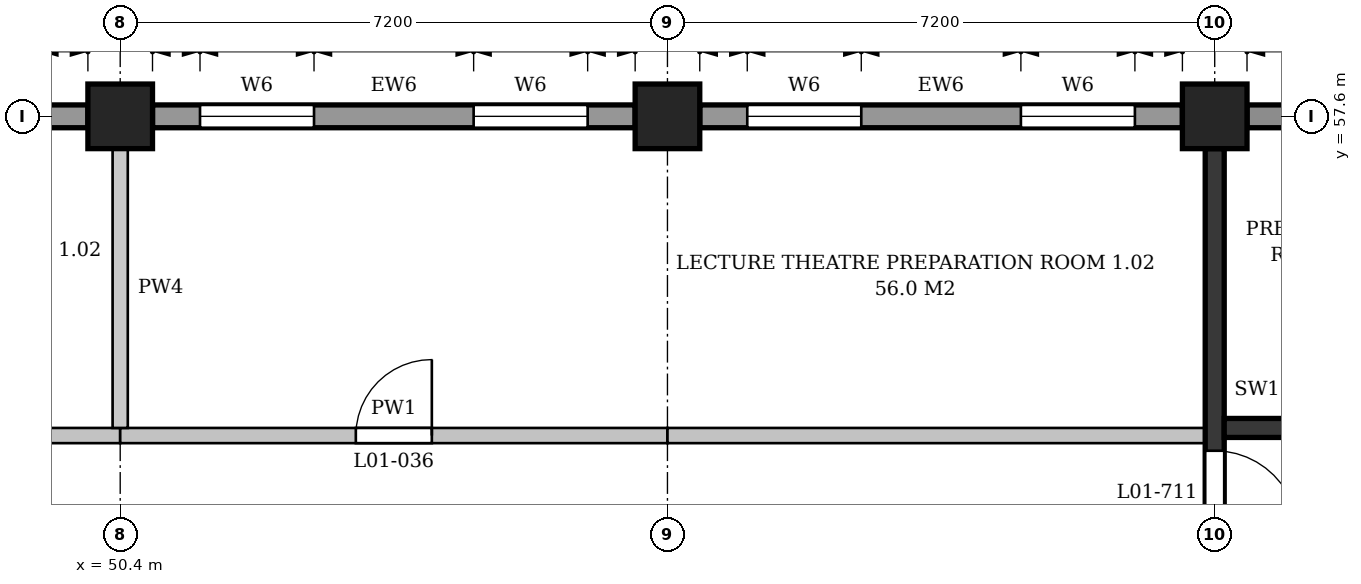
"""IFC4 building model, lengths in metres.
Left out: names, types, materials, properties, quantities, classifications, styles, units other than length and angle.
Written with IfcOpenShell. Run it as: python <this file> out.ifc"""

import sys

from ifc_helpers import new_model, si_unit, direction, frame, frame_2d, origin, origin_2d, place, context, subcontext, project, spatial, polyline, rectangle, outline, extrude, element, fill, save


model = new_model("IFC4")
c1 = context("Model", 3, precision=1e-05, world=origin(), true_north=direction((0.0, 1.0)))
c2 = subcontext(c1, "Body", "Model", "MODEL_VIEW")
j1 = project(units=[si_unit("LENGTHUNIT", "METRE"), si_unit("PLANEANGLEUNIT", "RADIAN")], contexts=[c1])
p1 = place(None, origin())
s1 = spatial("IfcSite", under=j1, at=p1, CompositionType="ELEMENT")
p2 = place(p1, origin())
s2 = spatial("IfcBuilding", under=s1, at=p2, CompositionType="ELEMENT")
p3 = place(p2, frame((0.0, 0.0, 6.0)))
s3 = spatial("IfcBuildingStorey", under=s2, at=p3, CompositionType="ELEMENT", Elevation=6.0)
for number, where, z_axis, x_axis in (
    (1, (50.4, 57.6, 0.0), (0.0, 0.0, 1.0), (1.0, 0.0, 0.0)),
    (2, (57.6, 57.6, 0.0), (0.0, 0.0, 1.0), (1.0, 0.0, 0.0)),
    (3, (64.8, 57.6, 0.0), (0.0, 0.0, 1.0), (1.0, 0.0, 0.0)),
):
    element("IfcColumn", number, at=place(p3, frame(where, z_axis=z_axis, x_axis=x_axis)), inside=s3, PredefinedType="COLUMN", context=c2, shape_type="SweptSolid", body=[
        extrude(rectangle(XDim=0.85, YDim=0.85, at=origin_2d()), origin(), (0.0, 0.0, 1.0), 5.4),
    ])
p4 = place(p3, frame((71.575, 57.6, 0.0), z_axis=(0.0, 0.0, 1.0), x_axis=(-1.0, 0.0, 0.0)))
e4 = element("IfcWall", 4, at=p4, inside=s3, PredefinedType="STANDARD", context=c2, shape_type="SweptSolid", body=[
    extrude(rectangle(XDim=6.35, YDim=0.3, at=frame_2d((3.175, 0.0))), origin(), (0.0, 0.0, 1.0), 4.7),
])
p5 = place(p4, frame((0.925, 0.0, 0.9)))
e5 = element("IfcOpeningElement", 5, at=p5, cuts=e4, PredefinedType="OPENING", context=c2, shape_type="SweptSolid", body=[
    extrude(outline(polyline([(0.0, 0.0), (0.9, 0.0), (0.9, 3.15), (0.45, 3.6), (0.0, 3.15), (0.0, 0.0)])), frame((0.0, 0.16, 0.0), z_axis=(0.0, -1.0, 0.0), x_axis=(1.0, 0.0, 0.0)), (0.0, 0.0, 1.0), 0.32),
])
p6 = place(p3, frame((64.375, 57.6, 0.0), z_axis=(0.0, 0.0, 1.0), x_axis=(-1.0, 0.0, 0.0)))
e6 = element("IfcWall", 6, at=p6, inside=s3, PredefinedType="STANDARD", context=c2, shape_type="SweptSolid", body=[
    extrude(rectangle(XDim=6.35, YDim=0.3, at=frame_2d((3.175, 0.0))), origin(), (0.0, 0.0, 1.0), 4.7),
])
p7 = place(p6, frame((0.625, 0.0, 0.9)))
e7 = element("IfcOpeningElement", 7, at=p7, cuts=e6, PredefinedType="OPENING", context=c2, shape_type="SweptSolid", body=[
    extrude(outline(polyline([(0.0, 0.0), (1.5, 0.0), (1.5, 2.85), (0.75, 3.6), (0.0, 2.85), (0.0, 0.0)])), frame((0.0, 0.16, 0.0), z_axis=(0.0, -1.0, 0.0), x_axis=(1.0, 0.0, 0.0)), (0.0, 0.0, 1.0), 0.32),
])
p8 = place(p6, frame((4.225, 0.0, 0.9)))
e8 = element("IfcOpeningElement", 8, at=p8, cuts=e6, PredefinedType="OPENING", context=c2, shape_type="SweptSolid", body=[
    extrude(outline(polyline([(0.0, 0.0), (1.5, 0.0), (1.5, 2.85), (0.75, 3.6), (0.0, 2.85), (0.0, 0.0)])), frame((0.0, 0.16, 0.0), z_axis=(0.0, -1.0, 0.0), x_axis=(1.0, 0.0, 0.0)), (0.0, 0.0, 1.0), 0.32),
])
p9 = place(p3, frame((57.175, 57.6, 0.0), z_axis=(0.0, 0.0, 1.0), x_axis=(-1.0, 0.0, 0.0)))
e9 = element("IfcWall", 9, at=p9, inside=s3, PredefinedType="STANDARD", context=c2, shape_type="SweptSolid", body=[
    extrude(rectangle(XDim=6.35, YDim=0.3, at=frame_2d((3.175, 0.0))), origin(), (0.0, 0.0, 1.0), 4.7),
])
p10 = place(p9, frame((0.625, 0.0, 0.9)))
e10 = element("IfcOpeningElement", 10, at=p10, cuts=e9, PredefinedType="OPENING", context=c2, shape_type="SweptSolid", body=[
    extrude(outline(polyline([(0.0, 0.0), (1.5, 0.0), (1.5, 2.85), (0.75, 3.6), (0.0, 2.85), (0.0, 0.0)])), frame((0.0, 0.16, 0.0), z_axis=(0.0, -1.0, 0.0), x_axis=(1.0, 0.0, 0.0)), (0.0, 0.0, 1.0), 0.32),
])
p11 = place(p9, frame((4.225, 0.0, 0.9)))
e11 = element("IfcOpeningElement", 11, at=p11, cuts=e9, PredefinedType="OPENING", context=c2, shape_type="SweptSolid", body=[
    extrude(outline(polyline([(0.0, 0.0), (1.5, 0.0), (1.5, 2.85), (0.75, 3.6), (0.0, 2.85), (0.0, 0.0)])), frame((0.0, 0.16, 0.0), z_axis=(0.0, -1.0, 0.0), x_axis=(1.0, 0.0, 0.0)), (0.0, 0.0, 1.0), 0.32),
])
p12 = place(p3, frame((49.975, 57.6, 0.0), z_axis=(0.0, 0.0, 1.0), x_axis=(-1.0, 0.0, 0.0)))
e12 = element("IfcWall", 12, at=p12, inside=s3, PredefinedType="STANDARD", context=c2, shape_type="SweptSolid", body=[
    extrude(rectangle(XDim=6.35, YDim=0.3, at=frame_2d((3.175, 0.0))), origin(), (0.0, 0.0, 1.0), 4.7),
])
p13 = place(p12, frame((0.625, 0.0, 0.9)))
e13 = element("IfcOpeningElement", 13, at=p13, cuts=e12, PredefinedType="OPENING", context=c2, shape_type="SweptSolid", body=[
    extrude(outline(polyline([(0.0, 0.0), (1.5, 0.0), (1.5, 2.85), (0.75, 3.6), (0.0, 2.85), (0.0, 0.0)])), frame((0.0, 0.16, 0.0), z_axis=(0.0, -1.0, 0.0), x_axis=(1.0, 0.0, 0.0)), (0.0, 0.0, 1.0), 0.32),
])
p14 = place(p12, frame((4.225, 0.0, 0.9)))
e14 = element("IfcOpeningElement", 14, at=p14, cuts=e12, PredefinedType="OPENING", context=c2, shape_type="SweptSolid", body=[
    extrude(outline(polyline([(0.0, 0.0), (1.5, 0.0), (1.5, 2.85), (0.75, 3.6), (0.0, 2.85), (0.0, 0.0)])), frame((0.0, 0.16, 0.0), z_axis=(0.0, -1.0, 0.0), x_axis=(1.0, 0.0, 0.0)), (0.0, 0.0, 1.0), 0.32),
])
p15 = place(p3, frame((64.8, 50.825, 0.0), z_axis=(0.0, 0.0, 1.0), x_axis=(0.0, 1.0, 0.0)))
e15 = element("IfcWall", 15, at=p15, inside=s3, PredefinedType="SHEAR", context=c2, shape_type="SweptSolid", body=[
    extrude(rectangle(XDim=6.35, YDim=0.25, at=frame_2d((3.175, 0.0))), origin(), (0.0, 0.0, 1.0), 4.7),
])
p16 = place(p15, frame((1.275, 0.0, 0.0)))
e16 = element("IfcOpeningElement", 16, at=p16, cuts=e15, PredefinedType="OPENING", context=c2, shape_type="SweptSolid", body=[
    extrude(rectangle(XDim=1.1, YDim=2.1, at=frame_2d((0.55, 1.05))), frame((0.0, 0.135, 0.0), z_axis=(0.0, -1.0, 0.0), x_axis=(1.0, 0.0, 0.0)), (0.0, 0.0, 1.0), 0.27),
])
p17 = place(p3, frame((64.925, 53.5, 0.0), z_axis=(0.0, 0.0, 1.0), x_axis=(1.0, 0.0, 0.0)))
e17 = element("IfcWall", 17, at=p17, inside=s3, PredefinedType="SHEAR", context=c2, shape_type="SweptSolid", body=[
    extrude(rectangle(XDim=2.975, YDim=0.25, at=frame_2d((1.487, 0.0))), origin(), (0.0, 0.0, 1.0), 4.7),
])
p18 = place(p17, frame((1.525, 0.0, 0.0)))
e18 = element("IfcOpeningElement", 18, at=p18, cuts=e17, PredefinedType="OPENING", context=c2, shape_type="SweptSolid", body=[
    extrude(rectangle(XDim=0.9, YDim=2.1, at=frame_2d((0.45, 1.05))), frame((0.0, 0.135, 0.0), z_axis=(0.0, -1.0, 0.0), x_axis=(1.0, 0.0, 0.0)), (0.0, 0.0, 1.0), 0.27),
])
p19 = place(p3, frame((43.2, 53.4, 0.0), z_axis=(0.0, 0.0, 1.0), x_axis=(1.0, 0.0, 0.0)))
e19 = element("IfcWall", 19, at=p19, inside=s3, PredefinedType="PARTITIONING", context=c2, shape_type="SweptSolid", body=[
    extrude(rectangle(XDim=7.2, YDim=0.2, at=frame_2d((3.6, 0.0))), origin(), (0.0, 0.0, 1.0), 4.7),
])
p20 = place(p19, frame((3.1, 0.0, 0.0)))
e20 = element("IfcOpeningElement", 20, at=p20, cuts=e19, PredefinedType="OPENING", context=c2, shape_type="SweptSolid", body=[
    extrude(rectangle(XDim=1.0, YDim=2.1, at=frame_2d((0.5, 1.05))), frame((0.0, 0.11, 0.0), z_axis=(0.0, -1.0, 0.0), x_axis=(1.0, 0.0, 0.0)), (0.0, 0.0, 1.0), 0.22),
])
p21 = place(p3, frame((50.4, 53.4, 0.0), z_axis=(0.0, 0.0, 1.0), x_axis=(1.0, 0.0, 0.0)))
e21 = element("IfcWall", 21, at=p21, inside=s3, PredefinedType="PARTITIONING", context=c2, shape_type="SweptSolid", body=[
    extrude(rectangle(XDim=7.2, YDim=0.2, at=frame_2d((3.6, 0.0))), origin(), (0.0, 0.0, 1.0), 4.7),
])
p22 = place(p21, frame((3.1, 0.0, 0.0)))
e22 = element("IfcOpeningElement", 22, at=p22, cuts=e21, PredefinedType="OPENING", context=c2, shape_type="SweptSolid", body=[
    extrude(rectangle(XDim=1.0, YDim=2.1, at=frame_2d((0.5, 1.05))), frame((0.0, 0.11, 0.0), z_axis=(0.0, -1.0, 0.0), x_axis=(1.0, 0.0, 0.0)), (0.0, 0.0, 1.0), 0.22),
])
p23 = place(p3, frame((57.6, 53.4, 0.0), z_axis=(0.0, 0.0, 1.0), x_axis=(1.0, 0.0, 0.0)))
e23 = element("IfcWall", 23, at=p23, inside=s3, PredefinedType="PARTITIONING", context=c2, shape_type="SweptSolid", body=[
    extrude(rectangle(XDim=7.075, YDim=0.2, at=frame_2d((3.538, 0.0))), origin(), (0.0, 0.0, 1.0), 4.7),
])
p24 = place(p3, frame((50.4, 53.5, 0.0), z_axis=(0.0, 0.0, 1.0), x_axis=(0.0, 1.0, 0.0)))
e24 = element("IfcWall", 24, at=p24, inside=s3, PredefinedType="PARTITIONING", context=c2, shape_type="SweptSolid", body=[
    extrude(rectangle(XDim=3.675, YDim=0.2, at=frame_2d((1.837, 0.0))), origin(), (0.0, 0.0, 1.0), 4.7),
])
p25 = place(p7, origin())
e25 = element("IfcWindow", 25, at=p25, inside=s3, PartitioningType="SINGLE_PANEL", PredefinedType="WINDOW", context=c2, shape_type="SweptSolid", body=[
    extrude(outline(polyline([(0.0, 0.0), (1.5, 0.0), (1.5, 2.85), (0.75, 3.6), (0.0, 2.85), (0.0, 0.0)])), frame((0.0, 0.03, 0.0), z_axis=(0.0, -1.0, 0.0), x_axis=(1.0, 0.0, 0.0)), (0.0, 0.0, 1.0), 0.06),
])
fill(e7, e25)
p26 = place(p8, origin())
e26 = element("IfcWindow", 26, at=p26, inside=s3, PartitioningType="SINGLE_PANEL", PredefinedType="WINDOW", context=c2, shape_type="SweptSolid", body=[
    extrude(outline(polyline([(0.0, 0.0), (1.5, 0.0), (1.5, 2.85), (0.75, 3.6), (0.0, 2.85), (0.0, 0.0)])), frame((0.0, 0.03, 0.0), z_axis=(0.0, -1.0, 0.0), x_axis=(1.0, 0.0, 0.0)), (0.0, 0.0, 1.0), 0.06),
])
fill(e8, e26)
p27 = place(p10, origin())
e27 = element("IfcWindow", 27, at=p27, inside=s3, PartitioningType="SINGLE_PANEL", PredefinedType="WINDOW", context=c2, shape_type="SweptSolid", body=[
    extrude(outline(polyline([(0.0, 0.0), (1.5, 0.0), (1.5, 2.85), (0.75, 3.6), (0.0, 2.85), (0.0, 0.0)])), frame((0.0, 0.03, 0.0), z_axis=(0.0, -1.0, 0.0), x_axis=(1.0, 0.0, 0.0)), (0.0, 0.0, 1.0), 0.06),
])
fill(e10, e27)
p28 = place(p11, origin())
e28 = element("IfcWindow", 28, at=p28, inside=s3, PartitioningType="SINGLE_PANEL", PredefinedType="WINDOW", context=c2, shape_type="SweptSolid", body=[
    extrude(outline(polyline([(0.0, 0.0), (1.5, 0.0), (1.5, 2.85), (0.75, 3.6), (0.0, 2.85), (0.0, 0.0)])), frame((0.0, 0.03, 0.0), z_axis=(0.0, -1.0, 0.0), x_axis=(1.0, 0.0, 0.0)), (0.0, 0.0, 1.0), 0.06),
])
fill(e11, e28)
p29 = place(p16, frame((1.1, 0.0, 0.0), z_axis=(0.0, 0.0, 1.0), x_axis=(-1.0, 0.0, 0.0)))
e29 = element("IfcDoor", 29, at=p29, inside=s3, OperationType="SINGLE_SWING_RIGHT", PredefinedType="DOOR", context=c2, shape_type="SweptSolid", body=[
    extrude(rectangle(XDim=1.1, YDim=2.1, at=frame_2d((0.55, 1.05))), frame((0.0, 0.025, 0.0), z_axis=(0.0, -1.0, 0.0), x_axis=(1.0, 0.0, 0.0)), (0.0, 0.0, 1.0), 0.05),
])
fill(e16, e29)
p30 = place(p22, origin())
e30 = element("IfcDoor", 30, at=p30, inside=s3, OperationType="SINGLE_SWING_RIGHT", PredefinedType="DOOR", context=c2, shape_type="SweptSolid", body=[
    extrude(rectangle(XDim=1.0, YDim=2.1, at=frame_2d((0.5, 1.05))), frame((0.0, 0.025, 0.0), z_axis=(0.0, -1.0, 0.0), x_axis=(1.0, 0.0, 0.0)), (0.0, 0.0, 1.0), 0.05),
])
fill(e22, e30)
save(model, sys.argv[1])
